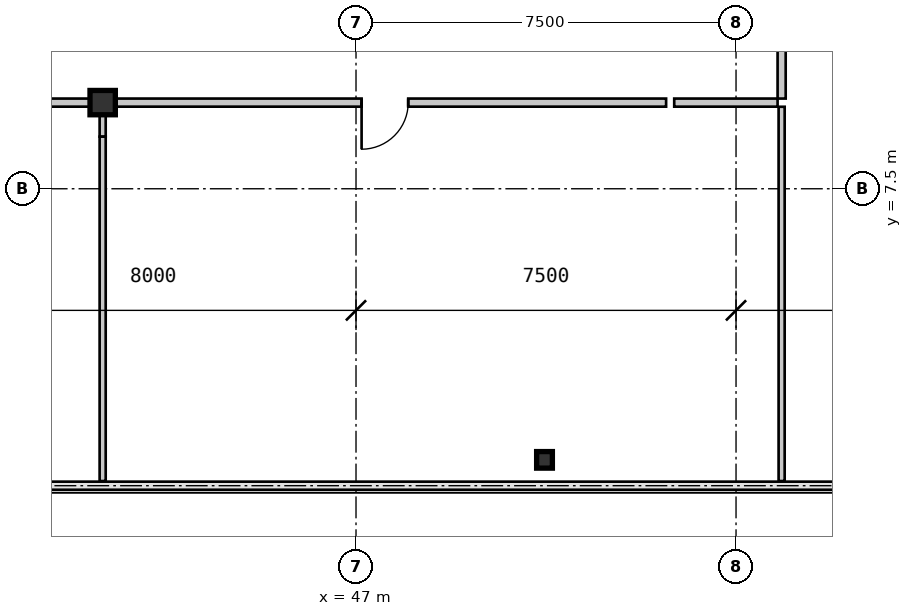
"""IFC4 building model, lengths in metres.
Left out: names, types, materials, properties, quantities, classifications, styles, units other than length and angle.
Written with IfcOpenShell. Run it as: python <this file> out.ifc"""

import sys

from ifc_helpers import new_model, si_unit, direction, frame, frame_2d, origin, origin_2d, place, context, subcontext, project, spatial, rectangle, i_section, extrude, source, transform, mapped, element, fill, save


model = new_model("IFC4")
c1 = context("Model", 3, precision=1e-05, world=origin(), true_north=direction((0.0, 1.0)))
c2 = subcontext(c1, "Body", "Model", "MODEL_VIEW")
j1 = project(units=[si_unit("LENGTHUNIT", "METRE"), si_unit("PLANEANGLEUNIT", "RADIAN")], contexts=[c1])
p1 = place(None, origin())
s1 = spatial("IfcSite", under=j1, at=p1, CompositionType="ELEMENT")
p2 = place(p1, origin())
s2 = spatial("IfcBuilding", under=s1, at=p2, CompositionType="ELEMENT")
p3 = place(p2, frame((0.0, 0.0, 38.85)))
s3 = spatial("IfcBuildingStorey", under=s2, at=p3, CompositionType="ELEMENT", Elevation=38.85)
m1 = source(origin(), c2, "Body", "SweptSolid", [
    extrude(i_section(OverallWidth=0.5, OverallDepth=0.48, WebThickness=0.028, FlangeThickness=0.044, at=origin_2d()), origin(), (0.0, 0.0, 1.0), 3.15),
])
p4 = place(p3, frame((42.0, 9.2, 0.0), z_axis=(0.0, 0.0, 1.0), x_axis=(1.0, 0.0, 0.0)))
e1 = element("IfcColumn", 1, at=p4, inside=s3, PredefinedType="COLUMN", context=c2, shape_type="MappedRepresentation", body=[
    mapped(m1, transform((0.0, 0.0, 0.0), scale=1.0)),
])
m2 = source(origin(), c2, "Body", "SweptSolid", [
    extrude(i_section(OverallWidth=0.311, OverallDepth=0.327, WebThickness=0.016, FlangeThickness=0.025, at=origin_2d()), origin(), (0.0, 0.0, 1.0), 3.15),
])
p5 = place(p3, frame((50.72, 2.15, 0.0), z_axis=(0.0, 0.0, 1.0), x_axis=(1.0, 0.0, 0.0)))
e2 = element("IfcColumn", 2, at=p5, inside=s3, PredefinedType="COLUMN", context=c2, shape_type="MappedRepresentation", body=[
    mapped(m2, transform((0.0, 0.0, 0.0), scale=1.0)),
])
m3 = source(origin(), c2, "Body", "SweptSolid", [
    extrude(rectangle(XDim=2.04, YDim=0.16, at=frame_2d((1.02, 0.0))), origin(), (0.0, 0.0, 1.0), 2.93),
])
p6 = place(p3, frame((55.32, 9.2, 0.0), z_axis=(0.0, 0.0, 1.0), x_axis=(-1.0, 0.0, 0.0)))
e3 = element("IfcWall", 3, at=p6, inside=s3, PredefinedType="PARTITIONING", context=c2, shape_type="MappedRepresentation", body=[
    mapped(m3, transform((0.0, 0.0, 0.0), scale=1.0)),
])
m4 = source(origin(), c2, "Body", "SweptSolid", [
    extrude(rectangle(XDim=5.5, YDim=0.16, at=frame_2d((2.75, 0.0))), origin(), (0.0, 0.0, 1.0), 2.93),
])
p7 = place(p3, frame((55.4, 14.78, 0.0), z_axis=(0.0, 0.0, 1.0), x_axis=(0.0, -1.0, 0.0)))
e4 = element("IfcWall", 4, at=p7, inside=s3, PredefinedType="PARTITIONING", context=c2, shape_type="MappedRepresentation", body=[
    mapped(m4, transform((0.0, 0.0, 0.0), scale=1.0)),
])
m5 = source(origin(), c2, "Body", "SweptSolid", [
    extrude(rectangle(XDim=0.92, YDim=2.1, at=frame_2d((0.46, 1.05))), frame((0.0, 0.09, 0.0), z_axis=(0.0, -1.0, 0.0), x_axis=(1.0, 0.0, 0.0)), (0.0, 0.0, 1.0), 0.18),
])
p8 = place(p7, frame((2.29, 0.0, 0.0)))
e5 = element("IfcOpeningElement", 5, at=p8, cuts=e4, PredefinedType="OPENING", context=c2, shape_type="MappedRepresentation", body=[
    mapped(m5, transform((0.0, 0.0, 0.0), scale=1.0)),
])
m6 = source(origin(), c2, "Body", "SweptSolid", [
    extrude(rectangle(XDim=13.959, YDim=0.16, at=frame_2d((6.98, 0.0))), origin(), (0.0, 0.0, 1.0), 2.328),
])
p9 = place(p3, frame((41.98, 9.2, 0.0), z_axis=(0.0, 0.0, 1.0), x_axis=(-1.0, 0.0, 0.0)))
e6 = element("IfcWall", 6, at=p9, inside=s3, PredefinedType="PARTITIONING", context=c2, shape_type="MappedRepresentation", body=[
    mapped(m6, transform((0.0, 0.0, 0.0), scale=1.0)),
])
p10 = place(p9, frame((6.52, 0.0, 0.0)))
e7 = element("IfcOpeningElement", 7, at=p10, cuts=e6, PredefinedType="OPENING", context=c2, shape_type="MappedRepresentation", body=[
    mapped(m5, transform((0.0, 0.0, 0.0), scale=1.0)),
])
m7 = source(origin(), c2, "Body", "SweptSolid", [
    extrude(rectangle(XDim=11.1, YDim=0.16, at=frame_2d((5.55, 0.0))), origin(), (0.0, 0.0, 1.0), 2.93),
])
p11 = place(p3, frame((53.12, 9.2, 0.0), z_axis=(0.0, 0.0, 1.0), x_axis=(-1.0, 0.0, 0.0)))
e8 = element("IfcWall", 8, at=p11, inside=s3, PredefinedType="PARTITIONING", context=c2, shape_type="MappedRepresentation", body=[
    mapped(m7, transform((0.0, 0.0, 0.0), scale=1.0)),
])
p12 = place(p11, frame((5.09, 0.0, 0.0)))
e9 = element("IfcOpeningElement", 9, at=p12, cuts=e8, PredefinedType="OPENING", context=c2, shape_type="MappedRepresentation", body=[
    mapped(m5, transform((0.0, 0.0, 0.0), scale=1.0)),
])
m8 = source(origin(), c2, "Body", "SweptSolid", [
    extrude(rectangle(XDim=0.59, YDim=0.12, at=frame_2d((0.295, 0.0))), origin(), (0.0, 0.0, 1.0), 2.397),
])
p13 = place(p3, frame((42.0, 9.118, 0.0), z_axis=(0.0, 0.0, 1.0), x_axis=(0.0, -1.0, 0.0)))
e10 = element("IfcWall", 10, at=p13, inside=s3, PredefinedType="PARTITIONING", context=c2, shape_type="MappedRepresentation", body=[
    mapped(m8, transform((0.0, 0.0, 0.0), scale=1.0)),
])
m9 = source(origin(), c2, "Body", "SweptSolid", [
    extrude(rectangle(XDim=6.796, YDim=0.12, at=frame_2d((3.398, 0.0))), origin(), (0.0, 0.0, 1.0), 2.93),
])
p14 = place(p3, frame((42.0, 8.528, 0.0), z_axis=(0.0, 0.0, 1.0), x_axis=(0.0, -1.0, 0.0)))
e11 = element("IfcWall", 11, at=p14, inside=s3, PredefinedType="PARTITIONING", context=c2, shape_type="MappedRepresentation", body=[
    mapped(m9, transform((0.0, 0.0, 0.0), scale=1.0)),
])
m10 = source(origin(), c2, "Body", "SweptSolid", [
    extrude(rectangle(XDim=7.386, YDim=0.12, at=frame_2d((3.693, 0.0))), origin(), (0.0, 0.0, 1.0), 2.93),
])
p15 = place(p3, frame((55.4, 9.118, 0.0), z_axis=(0.0, 0.0, 1.0), x_axis=(0.0, -1.0, 0.0)))
e12 = element("IfcWall", 12, at=p15, inside=s3, PredefinedType="PARTITIONING", context=c2, shape_type="MappedRepresentation", body=[
    mapped(m10, transform((0.0, 0.0, 0.0), scale=1.0)),
])
m11 = source(origin(), c2, "Body", "SweptSolid", [
    extrude(rectangle(XDim=0.92, YDim=2.1, at=frame_2d((0.46, 1.05))), frame((0.0, 0.025, 0.0), z_axis=(0.0, -1.0, 0.0), x_axis=(1.0, 0.0, 0.0)), (0.0, 0.0, 1.0), 0.05),
])
p16 = place(p12, origin())
e13 = element("IfcDoor", 13, at=p16, inside=s3, OperationType="SINGLE_SWING_RIGHT", PredefinedType="DOOR", context=c2, shape_type="MappedRepresentation", body=[
    mapped(m11, transform((0.0, 0.0, 0.0), scale=1.0)),
])
fill(e9, e13)
save(model, sys.argv[1])
